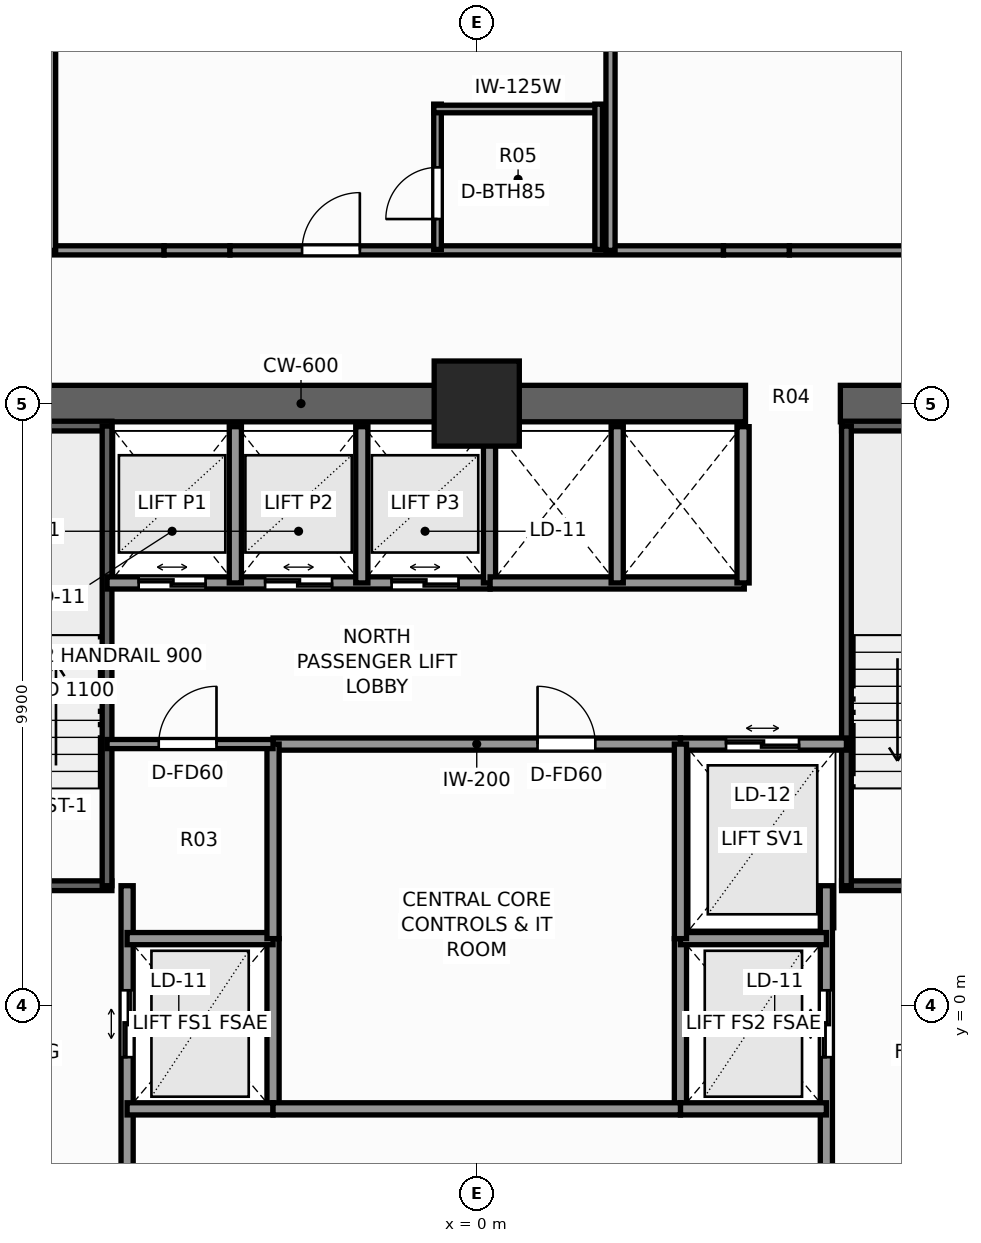
"""IFC4 building model, lengths in metres.
Left out: names, types, materials, properties, quantities, classifications, styles, units other than length and angle.
Written with IfcOpenShell. Run it as: python <this file> out.ifc"""

import sys

from ifc_helpers import new_model, si_unit, direction, frame, frame_2d, origin, origin_2d, place, context, subcontext, project, spatial, rectangle, extrude, element, fill, save


model = new_model("IFC4")
c1 = context("Model", 3, precision=1e-05, world=origin(), true_north=direction((0.0, 1.0)))
c2 = subcontext(c1, "Body", "Model", "MODEL_VIEW")
j1 = project(units=[si_unit("LENGTHUNIT", "METRE"), si_unit("PLANEANGLEUNIT", "RADIAN")], contexts=[c1])
p1 = place(None, origin())
s1 = spatial("IfcSite", under=j1, at=p1, CompositionType="ELEMENT")
p2 = place(p1, origin())
s2 = spatial("IfcBuilding", under=s1, at=p2, CompositionType="ELEMENT")
p3 = place(p2, frame((0.0, 0.0, 43.6)))
s3 = spatial("IfcBuildingStorey", under=s2, at=p3, CompositionType="ELEMENT", Elevation=43.6)
p4 = place(p3, frame((-10.2, 9.9, 0.0), z_axis=(0.0, 0.0, 1.0), x_axis=(1.0, 0.0, 0.0)))
e1 = element("IfcWall", 1, at=p4, inside=s3, PredefinedType="SHEAR", context=c2, shape_type="SweptSolid", body=[
    extrude(rectangle(XDim=14.62, YDim=0.6, at=frame_2d((7.31, 0.0))), origin(), (0.0, 0.0, 1.0), 3.3),
])
p5 = place(p3, frame((5.98, 9.9, 0.0), z_axis=(0.0, 0.0, 1.0), x_axis=(1.0, 0.0, 0.0)))
e2 = element("IfcWall", 2, at=p5, inside=s3, PredefinedType="SHEAR", context=c2, shape_type="SweptSolid", body=[
    extrude(rectangle(XDim=4.22, YDim=0.6, at=frame_2d((2.11, 0.0))), origin(), (0.0, 0.0, 1.0), 3.3),
])
p6 = place(p3, frame((0.0, 9.9, 0.0), z_axis=(0.0, 0.0, 1.0), x_axis=(1.0, 0.0, 0.0)))
e3 = element("IfcColumn", 3, at=p6, inside=s3, PredefinedType="COLUMN", context=c2, shape_type="SweptSolid", body=[
    extrude(rectangle(XDim=1.4, YDim=1.4, at=origin_2d()), origin(), (0.0, 0.0, 1.0), 3.3),
])
p7 = place(p3, frame((-9.52, 1.97, 0.0), z_axis=(0.0, 0.0, 1.0), x_axis=(1.0, 0.0, 0.0)))
e4 = element("IfcWall", 4, at=p7, inside=s3, PredefinedType="SHEAR", context=c2, shape_type="SweptSolid", body=[
    extrude(rectangle(XDim=3.52, YDim=0.16, at=frame_2d((1.76, 0.0))), origin(), (0.0, 0.0, 1.0), 3.3),
])
p8 = place(p7, frame((1.15, 0.0, 0.0)))
e5 = element("IfcOpeningElement", 5, at=p8, cuts=e4, PredefinedType="OPENING", context=c2, shape_type="SweptSolid", body=[
    extrude(rectangle(XDim=1.1, YDim=2.2, at=frame_2d((0.55, 1.1))), frame((0.0, 0.09, 0.0), z_axis=(0.0, -1.0, 0.0), x_axis=(1.0, 0.0, 0.0)), (0.0, 0.0, 1.0), 0.18),
])
p9 = place(p3, frame((-9.52, 9.53, 0.0), z_axis=(0.0, 0.0, 1.0), x_axis=(1.0, 0.0, 0.0)))
e6 = element("IfcWall", 6, at=p9, inside=s3, PredefinedType="SHEAR", context=c2, shape_type="SweptSolid", body=[
    extrude(rectangle(XDim=3.52, YDim=0.16, at=frame_2d((1.76, 0.0))), origin(), (0.0, 0.0, 1.0), 3.3),
])
p10 = place(p3, frame((-6.08, 1.97, 0.0), z_axis=(0.0, 0.0, 1.0), x_axis=(0.0, 1.0, 0.0)))
e7 = element("IfcWall", 7, at=p10, inside=s3, PredefinedType="SHEAR", context=c2, shape_type="SweptSolid", body=[
    extrude(rectangle(XDim=7.56, YDim=0.16, at=frame_2d((3.78, 0.0))), origin(), (0.0, 0.0, 1.0), 3.3),
])
p11 = place(p3, frame((6.0, 1.97, 0.0), z_axis=(0.0, 0.0, 1.0), x_axis=(1.0, 0.0, 0.0)))
e8 = element("IfcWall", 8, at=p11, inside=s3, PredefinedType="SHEAR", context=c2, shape_type="SweptSolid", body=[
    extrude(rectangle(XDim=3.52, YDim=0.16, at=frame_2d((1.76, 0.0))), origin(), (0.0, 0.0, 1.0), 3.3),
])
p12 = place(p11, frame((1.15, 0.0, 0.0)))
e9 = element("IfcOpeningElement", 9, at=p12, cuts=e8, PredefinedType="OPENING", context=c2, shape_type="SweptSolid", body=[
    extrude(rectangle(XDim=1.1, YDim=2.2, at=frame_2d((0.55, 1.1))), frame((0.0, 0.09, 0.0), z_axis=(0.0, -1.0, 0.0), x_axis=(1.0, 0.0, 0.0)), (0.0, 0.0, 1.0), 0.18),
])
p13 = place(p3, frame((6.0, 9.53, 0.0), z_axis=(0.0, 0.0, 1.0), x_axis=(1.0, 0.0, 0.0)))
e10 = element("IfcWall", 10, at=p13, inside=s3, PredefinedType="SHEAR", context=c2, shape_type="SweptSolid", body=[
    extrude(rectangle(XDim=3.52, YDim=0.16, at=frame_2d((1.76, 0.0))), origin(), (0.0, 0.0, 1.0), 3.3),
])
p14 = place(p3, frame((6.08, 1.97, 0.0), z_axis=(0.0, 0.0, 1.0), x_axis=(0.0, 1.0, 0.0)))
e11 = element("IfcWall", 11, at=p14, inside=s3, PredefinedType="SHEAR", context=c2, shape_type="SweptSolid", body=[
    extrude(rectangle(XDim=7.56, YDim=0.16, at=frame_2d((3.78, 0.0))), origin(), (0.0, 0.0, 1.0), 3.3),
])
p15 = place(p3, frame((-5.75, -3.6, 0.0), z_axis=(0.0, 0.0, 1.0), x_axis=(0.0, 1.0, 0.0)))
e12 = element("IfcWall", 12, at=p15, inside=s3, PredefinedType="SOLIDWALL", context=c2, shape_type="SweptSolid", body=[
    extrude(rectangle(XDim=5.57, YDim=0.2, at=frame_2d((2.785, 0.0))), origin(), (0.0, 0.0, 1.0), 3.06),
])
p16 = place(p15, frame((2.75, 0.0, 0.0)))
e13 = element("IfcOpeningElement", 13, at=p16, cuts=e12, PredefinedType="OPENING", context=c2, shape_type="SweptSolid", body=[
    extrude(rectangle(XDim=1.1, YDim=2.2, at=frame_2d((0.55, 1.1))), frame((0.0, 0.11, 0.0), z_axis=(0.0, -1.0, 0.0), x_axis=(1.0, 0.0, 0.0)), (0.0, 0.0, 1.0), 0.22),
])
p17 = place(p3, frame((-3.35, -1.7, 0.0), z_axis=(0.0, 0.0, 1.0), x_axis=(0.0, 1.0, 0.0)))
e14 = element("IfcWall", 14, at=p17, inside=s3, PredefinedType="SOLIDWALL", context=c2, shape_type="SweptSolid", body=[
    extrude(rectangle(XDim=2.8, YDim=0.2, at=frame_2d((1.4, 0.0))), origin(), (0.0, 0.0, 1.0), 3.06),
])
for number, where, z_axis, x_axis in (
    (15, (-5.75, -1.7, 0.0), (0.0, 0.0, 1.0), (1.0, 0.0, 0.0)),
    (16, (-5.75, 1.1, 0.0), (0.0, 0.0, 1.0), (1.0, 0.0, 0.0)),
):
    element("IfcWall", number, at=place(p3, frame(where, z_axis=z_axis, x_axis=x_axis)), inside=s3, PredefinedType="SOLIDWALL", context=c2, shape_type="SweptSolid", body=[
        extrude(rectangle(XDim=2.4, YDim=0.2, at=frame_2d((1.2, 0.0))), origin(), (0.0, 0.0, 1.0), 3.06),
    ])
p18 = place(p3, frame((5.75, -3.6, 0.0), z_axis=(0.0, 0.0, 1.0), x_axis=(0.0, 1.0, 0.0)))
e17 = element("IfcWall", 17, at=p18, inside=s3, PredefinedType="SOLIDWALL", context=c2, shape_type="SweptSolid", body=[
    extrude(rectangle(XDim=5.57, YDim=0.2, at=frame_2d((2.785, 0.0))), origin(), (0.0, 0.0, 1.0), 3.06),
])
p19 = place(p18, frame((2.75, 0.0, 0.0)))
e18 = element("IfcOpeningElement", 18, at=p19, cuts=e17, PredefinedType="OPENING", context=c2, shape_type="SweptSolid", body=[
    extrude(rectangle(XDim=1.1, YDim=2.2, at=frame_2d((0.55, 1.1))), frame((0.0, 0.11, 0.0), z_axis=(0.0, -1.0, 0.0), x_axis=(1.0, 0.0, 0.0)), (0.0, 0.0, 1.0), 0.22),
])
p20 = place(p3, frame((3.35, -1.7, 0.0), z_axis=(0.0, 0.0, 1.0), x_axis=(0.0, 1.0, 0.0)))
e19 = element("IfcWall", 19, at=p20, inside=s3, PredefinedType="SOLIDWALL", context=c2, shape_type="SweptSolid", body=[
    extrude(rectangle(XDim=2.8, YDim=0.2, at=frame_2d((1.4, 0.0))), origin(), (0.0, 0.0, 1.0), 3.06),
])
for number, where, z_axis, x_axis in (
    (20, (3.35, -1.7, 0.0), (0.0, 0.0, 1.0), (1.0, 0.0, 0.0)),
    (21, (3.35, 1.1, 0.0), (0.0, 0.0, 1.0), (1.0, 0.0, 0.0)),
):
    element("IfcWall", number, at=place(p3, frame(where, z_axis=z_axis, x_axis=x_axis)), inside=s3, PredefinedType="SOLIDWALL", context=c2, shape_type="SweptSolid", body=[
        extrude(rectangle(XDim=2.4, YDim=0.2, at=frame_2d((1.2, 0.0))), origin(), (0.0, 0.0, 1.0), 3.06),
    ])
p21 = place(p3, frame((3.35, 4.3, 0.0), z_axis=(0.0, 0.0, 1.0), x_axis=(1.0, 0.0, 0.0)))
e22 = element("IfcWall", 22, at=p21, inside=s3, PredefinedType="SOLIDWALL", context=c2, shape_type="SweptSolid", body=[
    extrude(rectangle(XDim=2.73, YDim=0.2, at=frame_2d((1.365, 0.0))), origin(), (0.0, 0.0, 1.0), 3.06),
])
p22 = place(p21, frame((0.75, 0.0, 0.0)))
e23 = element("IfcOpeningElement", 23, at=p22, cuts=e22, PredefinedType="OPENING", context=c2, shape_type="SweptSolid", body=[
    extrude(rectangle(XDim=1.2, YDim=2.25, at=frame_2d((0.6, 1.125))), frame((0.0, 0.11, 0.0), z_axis=(0.0, -1.0, 0.0), x_axis=(1.0, 0.0, 0.0)), (0.0, 0.0, 1.0), 0.22),
])
p23 = place(p3, frame((-6.08, 6.95, 0.0), z_axis=(0.0, 0.0, 1.0), x_axis=(1.0, 0.0, 0.0)))
e24 = element("IfcWall", 24, at=p23, inside=s3, PredefinedType="SOLIDWALL", context=c2, shape_type="SweptSolid", body=[
    extrude(rectangle(XDim=6.3, YDim=0.2, at=frame_2d((3.15, 0.0))), origin(), (0.0, 0.0, 1.0), 3.06),
])
p24 = place(p23, frame((0.52, 0.0, 0.0)))
e25 = element("IfcOpeningElement", 25, at=p24, cuts=e24, PredefinedType="OPENING", context=c2, shape_type="SweptSolid", body=[
    extrude(rectangle(XDim=1.1, YDim=2.2, at=frame_2d((0.55, 1.1))), frame((0.0, 0.11, 0.0), z_axis=(0.0, -1.0, 0.0), x_axis=(1.0, 0.0, 0.0)), (0.0, 0.0, 1.0), 0.22),
])
p25 = place(p23, frame((2.6, 0.0, 0.0)))
e26 = element("IfcOpeningElement", 26, at=p25, cuts=e24, PredefinedType="OPENING", context=c2, shape_type="SweptSolid", body=[
    extrude(rectangle(XDim=1.1, YDim=2.2, at=frame_2d((0.55, 1.1))), frame((0.0, 0.11, 0.0), z_axis=(0.0, -1.0, 0.0), x_axis=(1.0, 0.0, 0.0)), (0.0, 0.0, 1.0), 0.22),
])
p26 = place(p23, frame((4.68, 0.0, 0.0)))
e27 = element("IfcOpeningElement", 27, at=p26, cuts=e24, PredefinedType="OPENING", context=c2, shape_type="SweptSolid", body=[
    extrude(rectangle(XDim=1.1, YDim=2.2, at=frame_2d((0.55, 1.1))), frame((0.0, 0.11, 0.0), z_axis=(0.0, -1.0, 0.0), x_axis=(1.0, 0.0, 0.0)), (0.0, 0.0, 1.0), 0.22),
])
for number, where, z_axis, x_axis in (
    (28, (-3.97, 6.95, 0.0), (0.0, 0.0, 1.0), (0.0, 1.0, 0.0)),
    (29, (-1.89, 6.95, 0.0), (0.0, 0.0, 1.0), (0.0, 1.0, 0.0)),
    (30, (0.21, 6.95, 0.0), (0.0, 0.0, 1.0), (0.0, 1.0, 0.0)),
):
    element("IfcWall", number, at=place(p3, frame(where, z_axis=z_axis, x_axis=x_axis)), inside=s3, PredefinedType="SOLIDWALL", context=c2, shape_type="SweptSolid", body=[
        extrude(rectangle(XDim=2.57, YDim=0.2, at=frame_2d((1.285, 0.0))), origin(), (0.0, 0.0, 1.0), 3.06),
    ])
p27 = place(p3, frame((0.22, 6.95, 0.0), z_axis=(0.0, 0.0, 1.0), x_axis=(1.0, 0.0, 0.0)))
e31 = element("IfcWall", 31, at=p27, inside=s3, PredefinedType="SOLIDWALL", context=c2, shape_type="SweptSolid", body=[
    extrude(rectangle(XDim=4.18, YDim=0.2, at=frame_2d((2.09, 0.0))), origin(), (0.0, 0.0, 1.0), 3.06),
])
for number, where, z_axis, x_axis in (
    (32, (4.38, 6.95, 0.0), (0.0, 0.0, 1.0), (0.0, 1.0, 0.0)),
    (33, (2.31, 6.95, 0.0), (0.0, 0.0, 1.0), (0.0, 1.0, 0.0)),
):
    element("IfcWall", number, at=place(p3, frame(where, z_axis=z_axis, x_axis=x_axis)), inside=s3, PredefinedType="SOLIDWALL", context=c2, shape_type="SweptSolid", body=[
        extrude(rectangle(XDim=2.57, YDim=0.2, at=frame_2d((1.285, 0.0))), origin(), (0.0, 0.0, 1.0), 3.06),
    ])
p28 = place(p3, frame((-3.35, 4.3, 0.0), z_axis=(0.0, 0.0, 1.0), x_axis=(1.0, 0.0, 0.0)))
e34 = element("IfcWall", 34, at=p28, inside=s3, PredefinedType="SOLIDWALL", context=c2, shape_type="SweptSolid", body=[
    extrude(rectangle(XDim=6.7, YDim=0.2, at=frame_2d((3.35, 0.0))), origin(), (0.0, 0.0, 1.0), 3.06),
])
p29 = place(p28, frame((4.35, 0.0, 0.0)))
e35 = element("IfcOpeningElement", 35, at=p29, cuts=e34, PredefinedType="OPENING", context=c2, shape_type="SweptSolid", body=[
    extrude(rectangle(XDim=0.95, YDim=2.06, at=frame_2d((0.475, 1.03))), frame((0.0, 0.11, 0.0), z_axis=(0.0, -1.0, 0.0), x_axis=(1.0, 0.0, 0.0)), (0.0, 0.0, 1.0), 0.22),
])
p30 = place(p3, frame((-3.35, -1.7, 0.0), z_axis=(0.0, 0.0, 1.0), x_axis=(1.0, 0.0, 0.0)))
e36 = element("IfcWall", 36, at=p30, inside=s3, PredefinedType="SOLIDWALL", context=c2, shape_type="SweptSolid", body=[
    extrude(rectangle(XDim=6.7, YDim=0.2, at=frame_2d((3.35, 0.0))), origin(), (0.0, 0.0, 1.0), 3.06),
])
for number, where, z_axis, x_axis in (
    (37, (-3.35, 1.1, 0.0), (0.0, 0.0, 1.0), (0.0, 1.0, 0.0)),
    (38, (3.35, 1.1, 0.0), (0.0, 0.0, 1.0), (0.0, 1.0, 0.0)),
):
    element("IfcWall", number, at=place(p3, frame(where, z_axis=z_axis, x_axis=x_axis)), inside=s3, PredefinedType="SOLIDWALL", context=c2, shape_type="SweptSolid", body=[
        extrude(rectangle(XDim=3.2, YDim=0.2, at=frame_2d((1.6, 0.0))), origin(), (0.0, 0.0, 1.0), 3.06),
    ])
p31 = place(p3, frame((-6.08, 4.3, 0.0), z_axis=(0.0, 0.0, 1.0), x_axis=(1.0, 0.0, 0.0)))
e39 = element("IfcWall", 39, at=p31, inside=s3, PredefinedType="PARTITIONING", context=c2, shape_type="SweptSolid", body=[
    extrude(rectangle(XDim=2.73, YDim=0.15, at=frame_2d((1.365, 0.0))), origin(), (0.0, 0.0, 1.0), 3.06),
])
p32 = place(p31, frame((0.85, 0.0, 0.0)))
e40 = element("IfcOpeningElement", 40, at=p32, cuts=e39, PredefinedType="OPENING", context=c2, shape_type="SweptSolid", body=[
    extrude(rectangle(XDim=0.95, YDim=2.06, at=frame_2d((0.475, 1.03))), frame((0.0, 0.085, 0.0), z_axis=(0.0, -1.0, 0.0), x_axis=(1.0, 0.0, 0.0)), (0.0, 0.0, 1.0), 0.17),
])
p33 = place(p3, frame((-10.261, 12.42, 0.0), z_axis=(0.0, 0.0, 1.0), x_axis=(1.0, 0.0, 0.0)))
e41 = element("IfcWall", 41, at=p33, inside=s3, PredefinedType="PARTITIONING", context=c2, shape_type="SweptSolid", body=[
    extrude(rectangle(XDim=5.119, YDim=0.15, at=frame_2d((2.56, 0.0))), origin(), (0.0, 0.0, 1.0), 3.06),
])
p34 = place(p33, frame((1.32, 0.0, 0.0)))
e42 = element("IfcOpeningElement", 42, at=p34, cuts=e41, PredefinedType="OPENING", context=c2, shape_type="SweptSolid", body=[
    extrude(rectangle(XDim=0.9, YDim=2.06, at=frame_2d((0.45, 1.03))), frame((0.0, 0.085, 0.0), z_axis=(0.0, -1.0, 0.0), x_axis=(1.0, 0.0, 0.0)), (0.0, 0.0, 1.0), 0.17),
])
p35 = place(p3, frame((-5.142, 12.42, 0.0), z_axis=(0.0, 0.0, 1.0), x_axis=(1.0, 0.0, 0.0)))
e43 = element("IfcWall", 43, at=p35, inside=s3, PredefinedType="PARTITIONING", context=c2, shape_type="SweptSolid", body=[
    extrude(rectangle(XDim=1.084, YDim=0.15, at=frame_2d((0.542, 0.0))), origin(), (0.0, 0.0, 1.0), 1.545),
])
p36 = place(p3, frame((-4.058, 12.42, 0.0), z_axis=(0.0, 0.0, 1.0), x_axis=(1.0, 0.0, 0.0)))
e44 = element("IfcWall", 44, at=p36, inside=s3, PredefinedType="PARTITIONING", context=c2, shape_type="SweptSolid", body=[
    extrude(rectangle(XDim=8.116, YDim=0.15, at=frame_2d((4.058, 0.0))), origin(), (0.0, 0.0, 1.0), 2.585),
])
p37 = place(p36, frame((1.186, 0.0, 0.0)))
e45 = element("IfcOpeningElement", 45, at=p37, cuts=e44, PredefinedType="OPENING", context=c2, shape_type="SweptSolid", body=[
    extrude(rectangle(XDim=0.95, YDim=2.06, at=frame_2d((0.475, 1.03))), frame((0.0, 0.085, 0.0), z_axis=(0.0, -1.0, 0.0), x_axis=(1.0, 0.0, 0.0)), (0.0, 0.0, 1.0), 0.17),
])
p38 = place(p3, frame((4.058, 12.42, 0.0), z_axis=(0.0, 0.0, 1.0), x_axis=(1.0, 0.0, 0.0)))
e46 = element("IfcWall", 46, at=p38, inside=s3, PredefinedType="PARTITIONING", context=c2, shape_type="SweptSolid", body=[
    extrude(rectangle(XDim=1.084, YDim=0.15, at=frame_2d((0.542, 0.0))), origin(), (0.0, 0.0, 1.0), 1.545),
])
p39 = place(p3, frame((5.142, 12.42, 0.0), z_axis=(0.0, 0.0, 1.0), x_axis=(1.0, 0.0, 0.0)))
e47 = element("IfcWall", 47, at=p39, inside=s3, PredefinedType="PARTITIONING", context=c2, shape_type="SweptSolid", body=[
    extrude(rectangle(XDim=5.119, YDim=0.15, at=frame_2d((2.56, 0.0))), origin(), (0.0, 0.0, 1.0), 3.06),
])
p40 = place(p39, frame((1.943, 0.0, 0.0)))
e48 = element("IfcOpeningElement", 48, at=p40, cuts=e47, PredefinedType="OPENING", context=c2, shape_type="SweptSolid", body=[
    extrude(rectangle(XDim=0.9, YDim=2.06, at=frame_2d((0.45, 1.03))), frame((0.0, 0.085, 0.0), z_axis=(0.0, -1.0, 0.0), x_axis=(1.0, 0.0, 0.0)), (0.0, 0.0, 1.0), 0.17),
])
for number, where, z_axis, x_axis in (
    (49, (-7.0, 12.42, 0.0), (0.0, 0.0, 1.0), (0.0, 1.0, 0.0)),
    (50, (2.2, 12.42, 0.0), (0.0, 0.0, 1.0), (0.0, 1.0, 0.0)),
):
    element("IfcWall", number, at=place(p3, frame(where, z_axis=z_axis, x_axis=x_axis)), inside=s3, PredefinedType="PARTITIONING", context=c2, shape_type="SweptSolid", body=[
        extrude(rectangle(XDim=9.56, YDim=0.15, at=frame_2d((4.78, 0.0))), origin(), (0.0, 0.0, 1.0), 2.429),
    ])
p41 = place(p3, frame((-0.645, 12.435, 0.0), z_axis=(0.0, 0.0, 1.0), x_axis=(0.0, 1.0, 0.0)))
e51 = element("IfcWall", 51, at=p41, inside=s3, PredefinedType="PARTITIONING", context=c2, shape_type="SweptSolid", body=[
    extrude(rectangle(XDim=2.39, YDim=0.125, at=frame_2d((1.195, 0.0))), origin(), (0.0, 0.0, 1.0), 3.06),
])
p42 = place(p41, frame((0.5, 0.0, 0.0)))
e52 = element("IfcOpeningElement", 52, at=p42, cuts=e51, PredefinedType="OPENING", context=c2, shape_type="SweptSolid", body=[
    extrude(rectangle(XDim=0.85, YDim=2.03, at=frame_2d((0.425, 1.015))), frame((0.0, 0.073, 0.0), z_axis=(0.0, -1.0, 0.0), x_axis=(1.0, 0.0, 0.0)), (0.0, 0.0, 1.0), 0.145),
])
p43 = place(p3, frame((-0.705, 14.745, 0.0), z_axis=(0.0, 0.0, 1.0), x_axis=(1.0, 0.0, 0.0)))
e53 = element("IfcWall", 53, at=p43, inside=s3, PredefinedType="PARTITIONING", context=c2, shape_type="SweptSolid", body=[
    extrude(rectangle(XDim=2.77, YDim=0.125, at=frame_2d((1.385, 0.0))), origin(), (0.0, 0.0, 1.0), 2.585),
])
p44 = place(p3, frame((2.005, 12.435, 0.0), z_axis=(0.0, 0.0, 1.0), x_axis=(0.0, 1.0, 0.0)))
e54 = element("IfcWall", 54, at=p44, inside=s3, PredefinedType="PARTITIONING", context=c2, shape_type="SweptSolid", body=[
    extrude(rectangle(XDim=2.39, YDim=0.125, at=frame_2d((1.195, 0.0))), origin(), (0.0, 0.0, 1.0), 3.06),
])
p45 = place(p16, origin())
e55 = element("IfcDoor", 55, at=p45, inside=s3, OperationType="DOUBLE_DOOR_SLIDING", PredefinedType="DOOR", context=c2, shape_type="SweptSolid", body=[
    extrude(rectangle(XDim=1.1, YDim=2.2, at=frame_2d((0.55, 1.1))), frame((0.0, 0.025, 0.0), z_axis=(0.0, -1.0, 0.0), x_axis=(1.0, 0.0, 0.0)), (0.0, 0.0, 1.0), 0.05),
])
fill(e13, e55)
p46 = place(p19, origin())
e56 = element("IfcDoor", 56, at=p46, inside=s3, OperationType="DOUBLE_DOOR_SLIDING", PredefinedType="DOOR", context=c2, shape_type="SweptSolid", body=[
    extrude(rectangle(XDim=1.1, YDim=2.2, at=frame_2d((0.55, 1.1))), frame((0.0, 0.025, 0.0), z_axis=(0.0, -1.0, 0.0), x_axis=(1.0, 0.0, 0.0)), (0.0, 0.0, 1.0), 0.05),
])
fill(e18, e56)
p47 = place(p22, origin())
e57 = element("IfcDoor", 57, at=p47, inside=s3, OperationType="DOUBLE_DOOR_SLIDING", PredefinedType="DOOR", context=c2, shape_type="SweptSolid", body=[
    extrude(rectangle(XDim=1.2, YDim=2.25, at=frame_2d((0.6, 1.125))), frame((0.0, 0.025, 0.0), z_axis=(0.0, -1.0, 0.0), x_axis=(1.0, 0.0, 0.0)), (0.0, 0.0, 1.0), 0.05),
])
fill(e23, e57)
p48 = place(p24, origin())
e58 = element("IfcDoor", 58, at=p48, inside=s3, OperationType="DOUBLE_DOOR_SLIDING", PredefinedType="DOOR", context=c2, shape_type="SweptSolid", body=[
    extrude(rectangle(XDim=1.1, YDim=2.2, at=frame_2d((0.55, 1.1))), frame((0.0, 0.025, 0.0), z_axis=(0.0, -1.0, 0.0), x_axis=(1.0, 0.0, 0.0)), (0.0, 0.0, 1.0), 0.05),
])
fill(e25, e58)
p49 = place(p25, origin())
e59 = element("IfcDoor", 59, at=p49, inside=s3, OperationType="DOUBLE_DOOR_SLIDING", PredefinedType="DOOR", context=c2, shape_type="SweptSolid", body=[
    extrude(rectangle(XDim=1.1, YDim=2.2, at=frame_2d((0.55, 1.1))), frame((0.0, 0.025, 0.0), z_axis=(0.0, -1.0, 0.0), x_axis=(1.0, 0.0, 0.0)), (0.0, 0.0, 1.0), 0.05),
])
fill(e26, e59)
p50 = place(p26, origin())
e60 = element("IfcDoor", 60, at=p50, inside=s3, OperationType="DOUBLE_DOOR_SLIDING", PredefinedType="DOOR", context=c2, shape_type="SweptSolid", body=[
    extrude(rectangle(XDim=1.1, YDim=2.2, at=frame_2d((0.55, 1.1))), frame((0.0, 0.025, 0.0), z_axis=(0.0, -1.0, 0.0), x_axis=(1.0, 0.0, 0.0)), (0.0, 0.0, 1.0), 0.05),
])
fill(e27, e60)
p51 = place(p29, origin())
e61 = element("IfcDoor", 61, at=p51, inside=s3, OperationType="SINGLE_SWING_LEFT", PredefinedType="DOOR", context=c2, shape_type="SweptSolid", body=[
    extrude(rectangle(XDim=0.95, YDim=2.06, at=frame_2d((0.475, 1.03))), frame((0.0, 0.025, 0.0), z_axis=(0.0, -1.0, 0.0), x_axis=(1.0, 0.0, 0.0)), (0.0, 0.0, 1.0), 0.05),
])
fill(e35, e61)
p52 = place(p32, origin())
e62 = element("IfcDoor", 62, at=p52, inside=s3, OperationType="SINGLE_SWING_RIGHT", PredefinedType="DOOR", context=c2, shape_type="SweptSolid", body=[
    extrude(rectangle(XDim=0.95, YDim=2.06, at=frame_2d((0.475, 1.03))), frame((0.0, 0.025, 0.0), z_axis=(0.0, -1.0, 0.0), x_axis=(1.0, 0.0, 0.0)), (0.0, 0.0, 1.0), 0.05),
])
fill(e40, e62)
p53 = place(p42, origin())
e63 = element("IfcDoor", 63, at=p53, inside=s3, OperationType="SINGLE_SWING_LEFT", PredefinedType="DOOR", context=c2, shape_type="SweptSolid", body=[
    extrude(rectangle(XDim=0.85, YDim=2.03, at=frame_2d((0.425, 1.015))), frame((0.0, 0.025, 0.0), z_axis=(0.0, -1.0, 0.0), x_axis=(1.0, 0.0, 0.0)), (0.0, 0.0, 1.0), 0.05),
])
fill(e52, e63)
p54 = place(p37, origin())
e64 = element("IfcDoor", 64, at=p54, inside=s3, OperationType="SINGLE_SWING_RIGHT", PredefinedType="DOOR", context=c2, shape_type="SweptSolid", body=[
    extrude(rectangle(XDim=0.95, YDim=2.06, at=frame_2d((0.475, 1.03))), frame((0.0, 0.025, 0.0), z_axis=(0.0, -1.0, 0.0), x_axis=(1.0, 0.0, 0.0)), (0.0, 0.0, 1.0), 0.05),
])
fill(e45, e64)
save(model, sys.argv[1])
